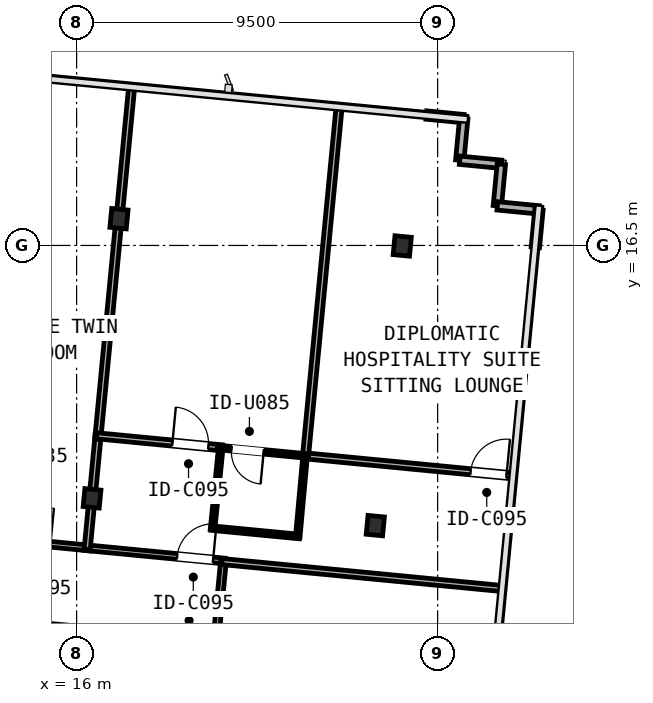
"""IFC4 building model, lengths in metres.
Left out: names, types, materials, properties, quantities, classifications, styles, units other than length and angle.
Written with IfcOpenShell. Run it as: python <this file> out.ifc"""

import sys

from ifc_helpers import new_model, si_unit, direction, frame, frame_2d, origin, origin_2d, place, context, subcontext, project, spatial, rectangle, i_section, extrude, element, fill, save


model = new_model("IFC4")
c1 = context("Model", 3, precision=1e-05, world=origin(), true_north=direction((0.0, 1.0)))
c2 = subcontext(c1, "Body", "Model", "MODEL_VIEW")
j1 = project(units=[si_unit("LENGTHUNIT", "METRE"), si_unit("PLANEANGLEUNIT", "RADIAN")], contexts=[c1])
p1 = place(None, origin())
s1 = spatial("IfcSite", under=j1, at=p1, CompositionType="ELEMENT")
p2 = place(p1, origin())
s2 = spatial("IfcBuilding", under=s1, at=p2, CompositionType="ELEMENT")
p3 = place(p2, frame((0.0, 0.0, 142.8)))
s3 = spatial("IfcBuildingStorey", under=s2, at=p3, CompositionType="ELEMENT", Elevation=142.8)
p4 = place(p3, frame((16.406, 9.846, 0.0), z_axis=(0.0, 0.0, 1.0), x_axis=(0.995396198367, -0.09584575252, 0.0)))
e1 = element("IfcColumn", 1, at=p4, inside=s3, PredefinedType="COLUMN", context=c2, shape_type="SweptSolid", body=[
    extrude(i_section(OverallWidth=0.424, OverallDepth=0.474, WebThickness=0.048, FlangeThickness=0.077, FilletRadius=0.031, at=origin_2d()), origin(), (0.0, 0.0, 1.0), 3.45),
])
for number, where, z_axis, x_axis in (
    (2, (17.115, 17.204, 0.0), (0.0, 0.0, 1.0), (0.995, -0.096, 0.0)),
    (3, (23.86, 9.128, 0.0), (0.0, 0.0, 1.0), (0.995, -0.096, 0.0)),
    (4, (24.568, 16.486, 0.0), (0.0, 0.0, 1.0), (0.995, -0.096, 0.0)),
):
    element("IfcColumn", number, at=place(p3, frame(where, z_axis=z_axis, x_axis=x_axis)), inside=s3, PredefinedType="COLUMN", context=c2, shape_type="SweptSolid", body=[
        extrude(i_section(OverallWidth=0.432, OverallDepth=0.498, WebThickness=0.056, FlangeThickness=0.089, FilletRadius=0.031, at=origin_2d()), origin(), (0.0, 0.0, 1.0), 3.45),
    ])
p5 = place(p3, frame((25.201, 19.931, 0.0), z_axis=(0.0, 0.0, 1.0), x_axis=(0.99541083642, -0.095693608655, 0.0)))
e5 = element("IfcWall", 5, at=p5, inside=s3, PredefinedType="STANDARD", context=c2, shape_type="SweptSolid", body=[
    extrude(rectangle(XDim=0.99, YDim=0.22, at=frame_2d((0.495, 0.0))), origin(), (0.0, 0.0, 1.0), 3.19),
])
p6 = place(p3, frame((26.187, 19.837, 0.0), z_axis=(0.0, 0.0, 1.0), x_axis=(-0.095657429048, -0.995414313875, 0.0)))
e6 = element("IfcWall", 6, at=p6, inside=s3, PredefinedType="STANDARD", context=c2, shape_type="SweptSolid", body=[
    extrude(rectangle(XDim=1.1, YDim=0.22, at=frame_2d((0.55, 0.0))), origin(), (0.0, 0.0, 1.0), 3.19),
])
p7 = place(p3, frame((26.082, 18.742, 0.0), z_axis=(0.0, 0.0, 1.0), x_axis=(0.995391116058, -0.095898519656, 0.0)))
e7 = element("IfcWall", 7, at=p7, inside=s3, PredefinedType="STANDARD", context=c2, shape_type="SweptSolid", body=[
    extrude(rectangle(XDim=1.1, YDim=0.22, at=frame_2d((0.55, 0.0))), origin(), (0.0, 0.0, 1.0), 3.19),
])
p8 = place(p3, frame((27.176, 18.636, 0.0), z_axis=(0.0, 0.0, 1.0), x_axis=(-0.095657429048, -0.995414313875, 0.0)))
e8 = element("IfcWall", 8, at=p8, inside=s3, PredefinedType="STANDARD", context=c2, shape_type="SweptSolid", body=[
    extrude(rectangle(XDim=1.1, YDim=0.22, at=frame_2d((0.55, 0.0))), origin(), (0.0, 0.0, 1.0), 3.19),
])
p9 = place(p3, frame((27.071, 17.541, 0.0), z_axis=(0.0, 0.0, 1.0), x_axis=(0.995391116058, -0.095898519656, 0.0)))
e9 = element("IfcWall", 9, at=p9, inside=s3, PredefinedType="STANDARD", context=c2, shape_type="SweptSolid", body=[
    extrude(rectangle(XDim=1.1, YDim=0.22, at=frame_2d((0.55, 0.0))), origin(), (0.0, 0.0, 1.0), 3.19),
])
p10 = place(p3, frame((28.166, 17.436, 0.0), z_axis=(0.0, 0.0, 1.0), x_axis=(-0.095693608655, -0.99541083642, 0.0)))
e10 = element("IfcWall", 10, at=p10, inside=s3, PredefinedType="STANDARD", context=c2, shape_type="SweptSolid", body=[
    extrude(rectangle(XDim=0.99, YDim=0.22, at=frame_2d((0.495, 0.0))), origin(), (0.0, 0.0, 1.0), 3.19),
])
p11 = place(p3, frame((14.061, 8.758, 0.0), z_axis=(0.0, 0.0, 1.0), x_axis=(0.995393345625, -0.095875374756, 0.0)))
e11 = element("IfcWall", 11, at=p11, inside=s3, PredefinedType="PARTITIONING", context=c2, shape_type="SweptSolid", body=[
    extrude(rectangle(XDim=2.312, YDim=0.15, at=frame_2d((1.156, 0.0))), origin(), (0.0, 0.0, 1.0), 2.479),
])
p12 = place(p11, frame((0.306, 0.0, 0.0)))
e12 = element("IfcOpeningElement", 12, at=p12, cuts=e11, PredefinedType="OPENING", context=c2, shape_type="SweptSolid", body=[
    extrude(rectangle(XDim=0.95, YDim=2.15, at=frame_2d((0.475, 1.075))), frame((0.0, 0.085, 0.0), z_axis=(0.0, -1.0, 0.0), x_axis=(1.0, 0.0, 0.0)), (0.0, 0.0, 1.0), 0.17),
])
p13 = place(p3, frame((16.199, 8.552, 0.0), z_axis=(0.0, 0.0, 1.0), x_axis=(0.995391104887, -0.095898635608, 0.0)))
e13 = element("IfcWall", 13, at=p13, inside=s3, PredefinedType="PARTITIONING", context=c2, shape_type="SweptSolid", body=[
    extrude(rectangle(XDim=3.722, YDim=0.15, at=frame_2d((1.861, 0.0))), origin(), (0.0, 0.0, 1.0), 2.479),
])
p14 = place(p13, frame((2.457, 0.0, 0.0)))
e14 = element("IfcOpeningElement", 14, at=p14, cuts=e13, PredefinedType="OPENING", context=c2, shape_type="SweptSolid", body=[
    extrude(rectangle(XDim=0.95, YDim=2.15, at=frame_2d((0.475, 1.075))), frame((0.0, 0.085, 0.0), z_axis=(0.0, -1.0, 0.0), x_axis=(1.0, 0.0, 0.0)), (0.0, 0.0, 1.0), 0.17),
])
p15 = place(p3, frame((16.156, 6.396, 0.0), z_axis=(0.0, 0.0, 1.0), x_axis=(-0.99539478422, 0.095860437863, 0.0)))
e15 = element("IfcWall", 15, at=p15, inside=s3, PredefinedType="PARTITIONING", context=c2, shape_type="SweptSolid", body=[
    extrude(rectangle(XDim=10.936, YDim=0.15, at=frame_2d((5.468, 0.0))), origin(), (0.0, 0.0, 1.0), 2.479),
])
p16 = place(p15, frame((3.675, 0.0, 0.0)))
e16 = element("IfcOpeningElement", 16, at=p16, cuts=e15, PredefinedType="OPENING", context=c2, shape_type="SweptSolid", body=[
    extrude(rectangle(XDim=0.85, YDim=2.05, at=frame_2d((0.425, 1.025))), frame((0.0, 0.085, 0.0), z_axis=(0.0, -1.0, 0.0), x_axis=(1.0, 0.0, 0.0)), (0.0, 0.0, 1.0), 0.17),
])
p17 = place(p3, frame((19.866, 8.219, 0.0), z_axis=(0.0, 0.0, 1.0), x_axis=(-0.095773447772, -0.995403157872, 0.0)))
e17 = element("IfcWall", 17, at=p17, inside=s3, PredefinedType="PARTITIONING", context=c2, shape_type="SweptSolid", body=[
    extrude(rectangle(XDim=2.21, YDim=0.15, at=frame_2d((1.105, 0.0))), origin(), (0.0, 0.0, 1.0), 2.718),
])
p18 = place(p3, frame((16.389, 9.671, 0.0), z_axis=(0.0, 0.0, 1.0), x_axis=(-0.095811626391, -0.995399483749, 0.0)))
e18 = element("IfcWall", 18, at=p18, inside=s3, PredefinedType="PARTITIONING", context=c2, shape_type="SweptSolid", body=[
    extrude(rectangle(XDim=1.172, YDim=0.16, at=frame_2d((0.586, 0.0))), origin(), (0.0, 0.0, 1.0), 2.479),
])
p19 = place(p3, frame((16.572, 11.57, 0.0), z_axis=(0.0, 0.0, 1.0), x_axis=(-0.095867871334, -0.99539406832, 0.0)))
e19 = element("IfcWall", 19, at=p19, inside=s3, PredefinedType="PARTITIONING", context=c2, shape_type="SweptSolid", body=[
    extrude(rectangle(XDim=1.556, YDim=0.16, at=frame_2d((0.778, 0.0))), origin(), (0.0, 0.0, 1.0), 2.479),
])
p20 = place(p3, frame((17.098, 17.029, 0.0), z_axis=(0.0, 0.0, 1.0), x_axis=(-0.095831010877, -0.995397617716, 0.0)))
e20 = element("IfcWall", 20, at=p20, inside=s3, PredefinedType="PARTITIONING", context=c2, shape_type="SweptSolid", body=[
    extrude(rectangle(XDim=5.648, YDim=0.16, at=frame_2d((2.824, 0.0))), origin(), (0.0, 0.0, 1.0), 2.479),
])
p21 = place(p3, frame((17.452, 20.708, 0.0), z_axis=(0.0, 0.0, 1.0), x_axis=(-0.095859866796, -0.995394839216, 0.0)))
e21 = element("IfcWall", 21, at=p21, inside=s3, PredefinedType="PARTITIONING", context=c2, shape_type="SweptSolid", body=[
    extrude(rectangle(XDim=3.344, YDim=0.16, at=frame_2d((1.672, 0.0))), origin(), (0.0, 0.0, 1.0), 3.19),
])
p22 = place(p3, frame((16.525, 11.492, 0.0), z_axis=(0.0, 0.0, 1.0), x_axis=(0.995395561935, -0.095852361889, 0.0)))
e22 = element("IfcWall", 22, at=p22, inside=s3, PredefinedType="PARTITIONING", context=c2, shape_type="SweptSolid", body=[
    extrude(rectangle(XDim=3.324, YDim=0.16, at=frame_2d((1.662, 0.0))), origin(), (0.0, 0.0, 1.0), 2.479),
])
p23 = place(p22, frame((2.004, 0.0, 0.0)))
e23 = element("IfcOpeningElement", 23, at=p23, cuts=e22, PredefinedType="OPENING", context=c2, shape_type="SweptSolid", body=[
    extrude(rectangle(XDim=0.95, YDim=2.15, at=frame_2d((0.475, 1.075))), frame((0.0, 0.09, 0.0), z_axis=(0.0, -1.0, 0.0), x_axis=(1.0, 0.0, 0.0)), (0.0, 0.0, 1.0), 0.18),
])
p24 = place(p3, frame((21.973, 10.968, 0.0), z_axis=(0.0, 0.0, 1.0), x_axis=(0.99539730528, -0.095834256092, 0.0)))
e24 = element("IfcWall", 24, at=p24, inside=s3, PredefinedType="PARTITIONING", context=c2, shape_type="SweptSolid", body=[
    extrude(rectangle(XDim=5.574, YDim=0.16, at=frame_2d((2.787, 0.0))), origin(), (0.0, 0.0, 1.0), 2.557),
])
p25 = place(p24, frame((4.414, 0.0, 0.0)))
e25 = element("IfcOpeningElement", 25, at=p25, cuts=e24, PredefinedType="OPENING", context=c2, shape_type="SweptSolid", body=[
    extrude(rectangle(XDim=0.95, YDim=2.15, at=frame_2d((0.475, 1.075))), frame((0.0, 0.09, 0.0), z_axis=(0.0, -1.0, 0.0), x_axis=(1.0, 0.0, 0.0)), (0.0, 0.0, 1.0), 0.18),
])
p26 = place(p3, frame((19.798, 11.217, 0.0), z_axis=(0.0, 0.0, 1.0), x_axis=(-0.100620321887, -0.994924897077, 0.0)))
e26 = element("IfcWall", 26, at=p26, inside=s3, PredefinedType="PARTITIONING", context=c2, shape_type="SweptSolid", body=[
    extrude(rectangle(XDim=2.208, YDim=0.12, at=frame_2d((1.104, 0.0))), origin(), (0.0, 0.0, 1.0), 2.479),
])
p27 = place(p3, frame((19.54, 9.064, 0.0), z_axis=(0.0, 0.0, 1.0), x_axis=(0.995393658532, -0.095872126059, 0.0)))
e27 = element("IfcWall", 27, at=p27, inside=s3, PredefinedType="PARTITIONING", context=c2, shape_type="SweptSolid", body=[
    extrude(rectangle(XDim=2.33, YDim=0.12, at=frame_2d((1.165, 0.0))), origin(), (0.0, 0.0, 1.0), 2.718),
])
p28 = place(p3, frame((21.816, 8.805, 0.0), z_axis=(0.0, 0.0, 1.0), x_axis=(0.09110395288, 0.995841387857, 0.0)))
e28 = element("IfcWall", 28, at=p28, inside=s3, PredefinedType="PARTITIONING", context=c2, shape_type="SweptSolid", body=[
    extrude(rectangle(XDim=2.208, YDim=0.12, at=frame_2d((1.104, 0.0))), origin(), (0.0, 0.0, 1.0), 2.479),
])
p29 = place(p3, frame((27.236, 7.469, 0.0), z_axis=(0.0, 0.0, 1.0), x_axis=(-0.995396228159, 0.095845443117, 0.0)))
e29 = element("IfcWall", 29, at=p29, inside=s3, PredefinedType="PARTITIONING", context=c2, shape_type="SweptSolid", body=[
    extrude(rectangle(XDim=7.448, YDim=0.16, at=frame_2d((3.724, 0.0))), origin(), (0.0, 0.0, 1.0), 2.557),
])
p30 = place(p3, frame((22.911, 20.182, 0.0), z_axis=(0.0, 0.0, 1.0), x_axis=(-0.095851937807, -0.995395602772, 0.0)))
e30 = element("IfcWall", 30, at=p30, inside=s3, PredefinedType="PARTITIONING", context=c2, shape_type="SweptSolid", body=[
    extrude(rectangle(XDim=9.302, YDim=0.16, at=frame_2d((4.651, 0.0))), origin(), (0.0, 0.0, 1.0), 2.557),
])
p31 = place(p3, frame((22.063, 10.959, 0.0), z_axis=(0.0, 0.0, 1.0), x_axis=(-0.995398273854, 0.095824195322, 0.0)))
e31 = element("IfcWall", 31, at=p31, inside=s3, PredefinedType="PARTITIONING", context=c2, shape_type="SweptSolid", body=[
    extrude(rectangle(XDim=2.372, YDim=0.12, at=frame_2d((1.186, 0.0))), origin(), (0.0, 0.0, 1.0), 2.718),
])
p32 = place(p31, frame((1.146, 0.0, 0.0)))
e32 = element("IfcOpeningElement", 32, at=p32, cuts=e31, PredefinedType="OPENING", context=c2, shape_type="SweptSolid", body=[
    extrude(rectangle(XDim=0.85, YDim=2.1, at=frame_2d((0.425, 1.05))), frame((0.0, 0.07, 0.0), z_axis=(0.0, -1.0, 0.0), x_axis=(1.0, 0.0, 0.0)), (0.0, 0.0, 1.0), 0.14),
])
p33 = place(p14, frame((0.95, 0.0, 0.0), z_axis=(0.0, 0.0, 1.0), x_axis=(-1.0, 0.0, 0.0)))
e33 = element("IfcDoor", 33, at=p33, inside=s3, OperationType="SINGLE_SWING_RIGHT", PredefinedType="DOOR", context=c2, shape_type="SweptSolid", body=[
    extrude(rectangle(XDim=0.95, YDim=2.15, at=frame_2d((0.475, 1.075))), frame((0.0, 0.025, 0.0), z_axis=(0.0, -1.0, 0.0), x_axis=(1.0, 0.0, 0.0)), (0.0, 0.0, 1.0), 0.05),
])
fill(e14, e33)
p34 = place(p23, origin())
e34 = element("IfcDoor", 34, at=p34, inside=s3, OperationType="SINGLE_SWING_LEFT", PredefinedType="DOOR", context=c2, shape_type="SweptSolid", body=[
    extrude(rectangle(XDim=0.95, YDim=2.15, at=frame_2d((0.475, 1.075))), frame((0.0, 0.025, 0.0), z_axis=(0.0, -1.0, 0.0), x_axis=(1.0, 0.0, 0.0)), (0.0, 0.0, 1.0), 0.05),
])
fill(e23, e34)
p35 = place(p25, origin())
e35 = element("IfcDoor", 35, at=p35, inside=s3, OperationType="SINGLE_SWING_RIGHT", PredefinedType="DOOR", context=c2, shape_type="SweptSolid", body=[
    extrude(rectangle(XDim=0.95, YDim=2.15, at=frame_2d((0.475, 1.075))), frame((0.0, 0.025, 0.0), z_axis=(0.0, -1.0, 0.0), x_axis=(1.0, 0.0, 0.0)), (0.0, 0.0, 1.0), 0.05),
])
fill(e25, e35)
p36 = place(p32, frame((0.85, 0.0, 0.0), z_axis=(0.0, 0.0, 1.0), x_axis=(-1.0, 0.0, 0.0)))
e36 = element("IfcDoor", 36, at=p36, inside=s3, OperationType="SINGLE_SWING_LEFT", PredefinedType="DOOR", context=c2, shape_type="SweptSolid", body=[
    extrude(rectangle(XDim=0.85, YDim=2.1, at=frame_2d((0.425, 1.05))), frame((0.0, 0.025, 0.0), z_axis=(0.0, -1.0, 0.0), x_axis=(1.0, 0.0, 0.0)), (0.0, 0.0, 1.0), 0.05),
])
fill(e32, e36)
save(model, sys.argv[1])
